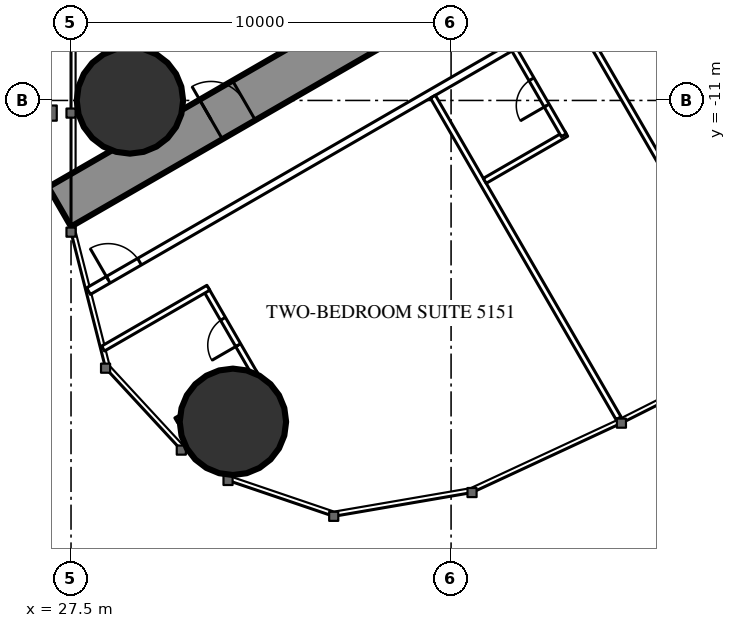
"""IFC4 building model, lengths in metres.
Left out: names, types, materials, properties, quantities, classifications, styles, units other than length and angle.
Written with IfcOpenShell. Run it as: python <this file> out.ifc"""

import sys

from ifc_helpers import new_model, si_unit, direction, frame, frame_2d, origin, origin_2d, place, context, subcontext, project, spatial, rectangle, circle, extrude, element, fill, save


model = new_model("IFC4")
c1 = context("Model", 3, precision=1e-05, world=origin(), true_north=direction((0.0, 1.0)))
c2 = subcontext(c1, "Body", "Model", "MODEL_VIEW")
j1 = project(units=[si_unit("LENGTHUNIT", "METRE"), si_unit("PLANEANGLEUNIT", "RADIAN")], contexts=[c1])
p1 = place(None, origin())
s1 = spatial("IfcSite", under=j1, at=p1, CompositionType="ELEMENT")
p2 = place(p1, origin())
s2 = spatial("IfcBuilding", under=s1, at=p2, CompositionType="ELEMENT")
p3 = place(p2, frame((0.0, 0.0, 191.3)))
s3 = spatial("IfcBuildingStorey", under=s2, at=p3, CompositionType="ELEMENT", Elevation=191.3)
for number, where, z_axis, x_axis in (
    (1, (31.76, -19.456, 0.0), (0.0, 0.0, 1.0), (1.0, 0.0, 0.0)),
    (2, (29.05, -11.0, 0.0), (0.0, 0.0, 1.0), (1.0, 0.0, 0.0)),
):
    element("IfcColumn", number, at=place(p3, frame(where, z_axis=z_axis, x_axis=x_axis)), inside=s3, PredefinedType="COLUMN", context=c2, shape_type="SweptSolid", body=[
        extrude(circle(Radius=1.4, at=origin_2d()), origin(), (0.0, 0.0, 1.0), 3.5),
    ])
p4 = place(p3, frame((27.2, -13.8, 0.0), z_axis=(0.0, 0.0, 1.0), x_axis=(0.866027159892, 0.499996958321, 0.0)))
e3 = element("IfcWall", 3, at=p4, inside=s3, PredefinedType="SHEAR", context=c2, shape_type="SweptSolid", body=[
    extrude(rectangle(XDim=27.947, YDim=1.2, at=frame_2d((13.973, 0.0))), origin(), (0.0, 0.0, 1.0), 3.5),
])
p5 = place(p4, frame((4.6, 0.0, 0.0)))
e4 = element("IfcOpeningElement", 4, at=p5, cuts=e3, PredefinedType="OPENING", context=c2, shape_type="SweptSolid", body=[
    extrude(rectangle(XDim=1.0, YDim=2.2, at=frame_2d((0.5, 1.1))), frame((0.0, 0.61, 0.0), z_axis=(0.0, -1.0, 0.0), x_axis=(1.0, 0.0, 0.0)), (0.0, 0.0, 1.0), 1.22),
])
p6 = place(p4, frame((13.395, 0.0, 0.0)))
e5 = element("IfcOpeningElement", 5, at=p6, cuts=e3, PredefinedType="OPENING", context=c2, shape_type="SweptSolid", body=[
    extrude(rectangle(XDim=1.8, YDim=2.2, at=frame_2d((0.9, 1.1))), frame((0.0, 0.61, 0.0), z_axis=(0.0, -1.0, 0.0), x_axis=(1.0, 0.0, 0.0)), (0.0, 0.0, 1.0), 1.22),
])
p7 = place(p3, frame((27.959, -16.017, 0.0), z_axis=(0.0, 0.0, 1.0), x_axis=(0.866024151371, 0.500002169237, 0.0)))
e6 = element("IfcWall", 6, at=p7, inside=s3, PredefinedType="PARTITIONING", context=c2, shape_type="SweptSolid", body=[
    extrude(rectangle(XDim=32.034, YDim=0.2, at=frame_2d((16.017, 0.0))), origin(), (0.0, 0.0, 1.0), 3.25),
])
p8 = place(p7, frame((0.6, 0.0, 0.0)))
e7 = element("IfcOpeningElement", 7, at=p8, cuts=e6, PredefinedType="OPENING", context=c2, shape_type="SweptSolid", body=[
    extrude(rectangle(XDim=0.95, YDim=2.2, at=frame_2d((0.475, 1.1))), frame((0.0, 0.11, 0.0), z_axis=(0.0, -1.0, 0.0), x_axis=(1.0, 0.0, 0.0)), (0.0, 0.0, 1.0), 0.22),
])
p9 = place(p7, frame((13.132, 0.0, 0.0)))
e8 = element("IfcOpeningElement", 8, at=p9, cuts=e6, PredefinedType="OPENING", context=c2, shape_type="SweptSolid", body=[
    extrude(rectangle(XDim=0.95, YDim=2.2, at=frame_2d((0.475, 1.1))), frame((0.0, 0.11, 0.0), z_axis=(0.0, -1.0, 0.0), x_axis=(1.0, 0.0, 0.0)), (0.0, 0.0, 1.0), 0.22),
])
p10 = place(p7, frame((15.391, 0.0, 0.0)))
e9 = element("IfcOpeningElement", 9, at=p10, cuts=e6, PredefinedType="OPENING", context=c2, shape_type="SweptSolid", body=[
    extrude(rectangle(XDim=0.95, YDim=2.2, at=frame_2d((0.475, 1.1))), frame((0.0, 0.11, 0.0), z_axis=(0.0, -1.0, 0.0), x_axis=(1.0, 0.0, 0.0)), (0.0, 0.0, 1.0), 0.22),
])
p11 = place(p7, frame((19.441, 0.0, 0.0)))
e10 = element("IfcOpeningElement", 10, at=p11, cuts=e6, PredefinedType="OPENING", context=c2, shape_type="SweptSolid", body=[
    extrude(rectangle(XDim=0.95, YDim=2.2, at=frame_2d((0.475, 1.1))), frame((0.0, 0.11, 0.0), z_axis=(0.0, -1.0, 0.0), x_axis=(1.0, 0.0, 0.0)), (0.0, 0.0, 1.0), 0.22),
])
p12 = place(p7, frame((26.406, 0.0, 0.0)))
e11 = element("IfcOpeningElement", 11, at=p12, cuts=e6, PredefinedType="OPENING", context=c2, shape_type="SweptSolid", body=[
    extrude(rectangle(XDim=0.95, YDim=2.2, at=frame_2d((0.475, 1.1))), frame((0.0, 0.11, 0.0), z_axis=(0.0, -1.0, 0.0), x_axis=(1.0, 0.0, 0.0)), (0.0, 0.0, 1.0), 0.22),
])
p13 = place(p7, frame((28.87, 0.0, 0.0)))
e12 = element("IfcOpeningElement", 12, at=p13, cuts=e6, PredefinedType="OPENING", context=c2, shape_type="SweptSolid", body=[
    extrude(rectangle(XDim=1.8, YDim=2.2, at=frame_2d((0.9, 1.1))), frame((0.0, 0.11, 0.0), z_axis=(0.0, -1.0, 0.0), x_axis=(1.0, 0.0, 0.0)), (0.0, 0.0, 1.0), 0.22),
])
p14 = place(p3, frame((37.022, -10.9, 0.0), z_axis=(0.0, 0.0, 1.0), x_axis=(0.499998620953, -0.866026199976, 0.0)))
e13 = element("IfcWall", 13, at=p14, inside=s3, PredefinedType="PARTITIONING", context=c2, shape_type="SweptSolid", body=[
    extrude(rectangle(XDim=9.77, YDim=0.15, at=frame_2d((4.885, 0.0))), origin(), (0.0, 0.0, 1.0), 3.25),
])
p15 = place(p3, frame((40.769, -8.737, 0.0), z_axis=(0.0, 0.0, 1.0), x_axis=(0.500013115284, -0.866017831539, 0.0)))
e14 = element("IfcWall", 14, at=p15, inside=s3, PredefinedType="PARTITIONING", context=c2, shape_type="SweptSolid", body=[
    extrude(rectangle(XDim=7.198, YDim=0.15, at=frame_2d((3.599, 0.0))), origin(), (0.0, 0.0, 1.0), 2.3),
])
p16 = place(p3, frame((30.269, -19.418, 0.0), z_axis=(0.0, 0.0, 1.0), x_axis=(0.866006523861, 0.500032699561, 0.0)))
e15 = element("IfcWall", 15, at=p16, inside=s3, PredefinedType="PARTITIONING", context=c2, shape_type="SweptSolid", body=[
    extrude(rectangle(XDim=2.475, YDim=0.15, at=frame_2d((1.237, 0.0))), origin(), (0.0, 0.0, 1.0), 3.25),
])
p17 = place(p3, frame((31.048, -15.966, 0.0), z_axis=(0.0, 0.0, 1.0), x_axis=(0.499936506574, -0.866062058628, 0.0)))
e16 = element("IfcWall", 16, at=p17, inside=s3, PredefinedType="PARTITIONING", context=c2, shape_type="SweptSolid", body=[
    extrude(rectangle(XDim=2.6, YDim=0.15, at=frame_2d((1.3, 0.0))), origin(), (0.0, 0.0, 1.0), 2.3),
])
p18 = place(p17, frame((0.9, 0.0, 0.0)))
e17 = element("IfcOpeningElement", 17, at=p18, cuts=e16, PredefinedType="OPENING", context=c2, shape_type="SweptSolid", body=[
    extrude(rectangle(XDim=0.8, YDim=2.2, at=frame_2d((0.4, 1.1))), frame((0.0, 0.085, 0.0), z_axis=(0.0, -1.0, 0.0), x_axis=(1.0, 0.0, 0.0)), (0.0, 0.0, 1.0), 0.17),
])
p19 = place(p3, frame((28.343, -17.528, 0.0), z_axis=(0.0, 0.0, 1.0), x_axis=(0.86600760081, 0.500030834389, 0.0)))
e18 = element("IfcWall", 18, at=p19, inside=s3, PredefinedType="PARTITIONING", context=c2, shape_type="SweptSolid", body=[
    extrude(rectangle(XDim=3.198, YDim=0.15, at=frame_2d((1.599, 0.0))), origin(), (0.0, 0.0, 1.0), 3.25),
])
p20 = place(p3, frame((38.387, -13.115, 0.0), z_axis=(0.0, 0.0, 1.0), x_axis=(0.866073894602, 0.499916002032, 0.0)))
e19 = element("IfcWall", 19, at=p20, inside=s3, PredefinedType="PARTITIONING", context=c2, shape_type="SweptSolid", body=[
    extrude(rectangle(XDim=2.475, YDim=0.15, at=frame_2d((1.238, 0.0))), origin(), (0.0, 0.0, 1.0), 3.25),
])
p21 = place(p3, frame((39.166, -9.663, 0.0), z_axis=(0.0, 0.0, 1.0), x_axis=(0.500006934395, -0.866021400173, 0.0)))
e20 = element("IfcWall", 20, at=p21, inside=s3, PredefinedType="PARTITIONING", context=c2, shape_type="SweptSolid", body=[
    extrude(rectangle(XDim=2.6, YDim=0.15, at=frame_2d((1.3, 0.0))), origin(), (0.0, 0.0, 1.0), 3.25),
])
p22 = place(p21, frame((0.9, 0.0, 0.0)))
e21 = element("IfcOpeningElement", 21, at=p22, cuts=e20, PredefinedType="OPENING", context=c2, shape_type="SweptSolid", body=[
    extrude(rectangle(XDim=0.8, YDim=2.2, at=frame_2d((0.4, 1.1))), frame((0.0, 0.085, 0.0), z_axis=(0.0, -1.0, 0.0), x_axis=(1.0, 0.0, 0.0)), (0.0, 0.0, 1.0), 0.17),
])
p23 = place(p3, frame((42.378, -7.808, 0.0), z_axis=(0.0, 0.0, 1.0), x_axis=(0.500006934395, -0.866021400173, 0.0)))
e22 = element("IfcWall", 22, at=p23, inside=s3, PredefinedType="PARTITIONING", context=c2, shape_type="SweptSolid", body=[
    extrude(rectangle(XDim=2.6, YDim=0.15, at=frame_2d((1.3, 0.0))), origin(), (0.0, 0.0, 1.0), 3.25),
])
p24 = place(p23, frame((0.9, 0.0, 0.0)))
e23 = element("IfcOpeningElement", 23, at=p24, cuts=e22, PredefinedType="OPENING", context=c2, shape_type="SweptSolid", body=[
    extrude(rectangle(XDim=0.8, YDim=2.2, at=frame_2d((0.4, 1.1))), frame((0.0, 0.085, 0.0), z_axis=(0.0, -1.0, 0.0), x_axis=(1.0, 0.0, 0.0)), (0.0, 0.0, 1.0), 0.17),
])
p25 = place(p18, origin())
e24 = element("IfcDoor", 24, at=p25, inside=s3, OperationType="SINGLE_SWING_RIGHT", PredefinedType="DOOR", context=c2, shape_type="SweptSolid", body=[
    extrude(rectangle(XDim=0.8, YDim=2.2, at=frame_2d((0.4, 1.1))), frame((0.0, 0.025, 0.0), z_axis=(0.0, -1.0, 0.0), x_axis=(1.0, 0.0, 0.0)), (0.0, 0.0, 1.0), 0.05),
])
fill(e17, e24)
p26 = place(p8, origin())
e25 = element("IfcDoor", 25, at=p26, inside=s3, OperationType="SINGLE_SWING_LEFT", PredefinedType="DOOR", context=c2, shape_type="SweptSolid", body=[
    extrude(rectangle(XDim=0.95, YDim=2.2, at=frame_2d((0.475, 1.1))), frame((0.0, 0.025, 0.0), z_axis=(0.0, -1.0, 0.0), x_axis=(1.0, 0.0, 0.0)), (0.0, 0.0, 1.0), 0.05),
])
fill(e7, e25)
p27 = place(p22, origin())
e26 = element("IfcDoor", 26, at=p27, inside=s3, OperationType="SINGLE_SWING_RIGHT", PredefinedType="DOOR", context=c2, shape_type="SweptSolid", body=[
    extrude(rectangle(XDim=0.8, YDim=2.2, at=frame_2d((0.4, 1.1))), frame((0.0, 0.025, 0.0), z_axis=(0.0, -1.0, 0.0), x_axis=(1.0, 0.0, 0.0)), (0.0, 0.0, 1.0), 0.05),
])
fill(e21, e26)
p28 = place(p5, origin())
e27 = element("IfcDoor", 27, at=p28, inside=s3, OperationType="SINGLE_SWING_LEFT", PredefinedType="DOOR", context=c2, shape_type="SweptSolid", body=[
    extrude(rectangle(XDim=1.0, YDim=2.2, at=frame_2d((0.5, 1.1))), frame((0.0, 0.025, 0.0), z_axis=(0.0, -1.0, 0.0), x_axis=(1.0, 0.0, 0.0)), (0.0, 0.0, 1.0), 0.05),
])
fill(e4, e27)
save(model, sys.argv[1])
